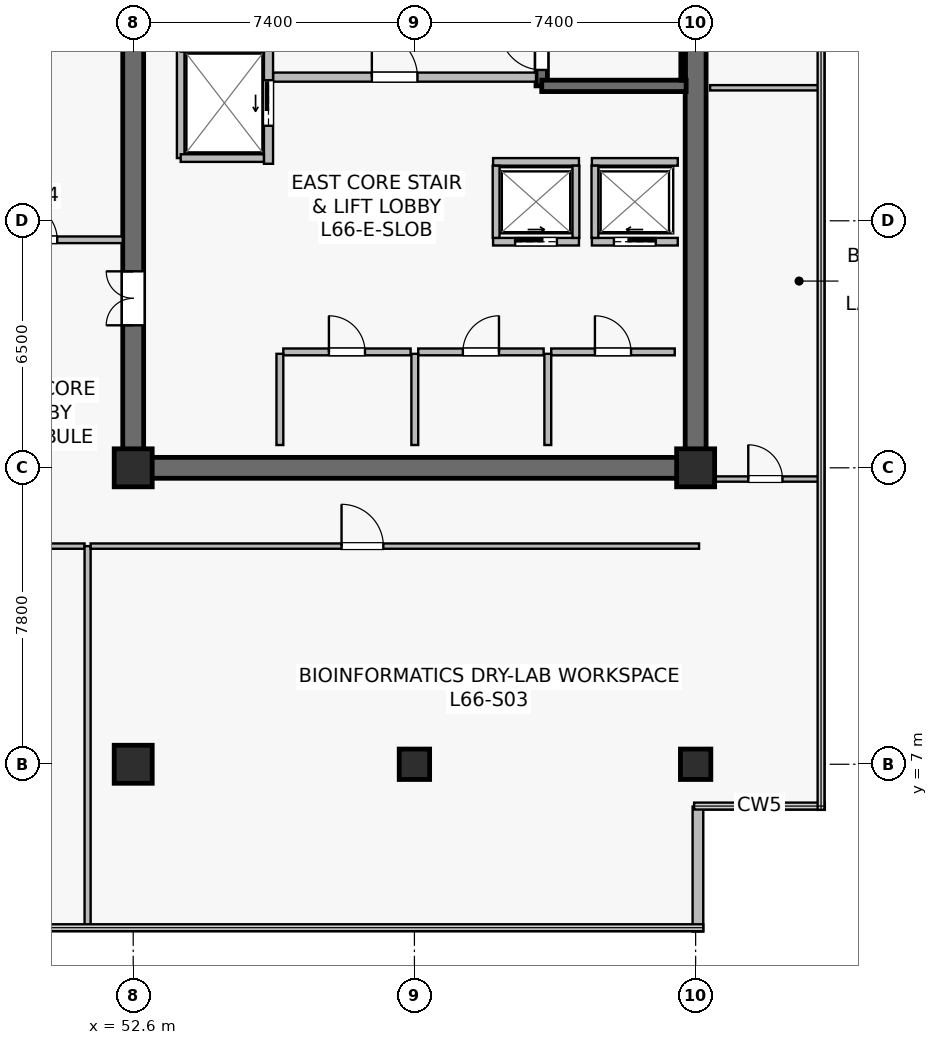
"""IFC4 building model, lengths in metres.
Left out: names, types, materials, properties, quantities, classifications, styles, units other than length and angle.
Written with IfcOpenShell. Run it as: python <this file> out.ifc"""

import sys

from ifc_helpers import new_model, si_unit, direction, frame, frame_2d, origin, origin_2d, place, context, subcontext, project, spatial, rectangle, extrude, source, transform, mapped, element, fill, save


model = new_model("IFC4")
c1 = context("Model", 3, precision=1e-05, world=origin(), true_north=direction((0.0, 1.0)))
c2 = subcontext(c1, "Body", "Model", "MODEL_VIEW")
j1 = project(units=[si_unit("LENGTHUNIT", "METRE"), si_unit("PLANEANGLEUNIT", "RADIAN")], contexts=[c1])
p1 = place(None, origin())
s1 = spatial("IfcSite", under=j1, at=p1, CompositionType="ELEMENT")
p2 = place(p1, origin())
s2 = spatial("IfcBuilding", under=s1, at=p2, CompositionType="ELEMENT")
p3 = place(p2, frame((0.0, 0.0, 275.2)))
s3 = spatial("IfcBuildingStorey", under=s2, at=p3, CompositionType="ELEMENT", Elevation=275.2)
p4 = place(p3, frame((52.325, 14.8, 0.0), z_axis=(0.0, 0.0, 1.0), x_axis=(1.0, 0.0, 0.0)))
e1 = element("IfcWall", 1, at=p4, inside=s3, PredefinedType="SHEAR", context=c2, shape_type="SweptSolid", body=[
    extrude(rectangle(XDim=15.35, YDim=0.55, at=frame_2d((7.675, 0.0))), origin(), (0.0, 0.0, 1.0), 3.8),
])
p5 = place(p3, frame((52.6, 15.075, 0.0), z_axis=(0.0, 0.0, 1.0), x_axis=(0.0, 1.0, 0.0)))
e2 = element("IfcWall", 2, at=p5, inside=s3, PredefinedType="SHEAR", context=c2, shape_type="SweptSolid", body=[
    extrude(rectangle(XDim=18.45, YDim=0.55, at=frame_2d((9.225, 0.0))), origin(), (0.0, 0.0, 1.0), 3.8),
])
p6 = place(p5, frame((3.475, 0.0, 0.0)))
e3 = element("IfcOpeningElement", 3, at=p6, cuts=e2, PredefinedType="OPENING", context=c2, shape_type="SweptSolid", body=[
    extrude(rectangle(XDim=1.42, YDim=2.2, at=frame_2d((0.71, 1.1))), frame((0.0, 0.285, 0.0), z_axis=(0.0, -1.0, 0.0), x_axis=(1.0, 0.0, 0.0)), (0.0, 0.0, 1.0), 0.57),
])
p7 = place(p3, frame((67.4, 15.075, 0.0), z_axis=(0.0, 0.0, 1.0), x_axis=(0.0, 1.0, 0.0)))
e4 = element("IfcWall", 4, at=p7, inside=s3, PredefinedType="SHEAR", context=c2, shape_type="SweptSolid", body=[
    extrude(rectangle(XDim=18.45, YDim=0.55, at=frame_2d((9.225, 0.0))), origin(), (0.0, 0.0, 1.0), 3.8),
])
p8 = place(p3, frame((63.35, 24.85, 0.0), z_axis=(0.0, 0.0, 1.0), x_axis=(0.0, 1.0, 0.0)))
e5 = element("IfcWall", 5, at=p8, inside=s3, PredefinedType="SHEAR", context=c2, shape_type="SweptSolid", body=[
    extrude(rectangle(XDim=8.63, YDim=0.3, at=frame_2d((4.315, 0.0))), origin(), (0.0, 0.0, 1.0), 3.8),
])
p9 = place(p8, frame((0.42, 0.0, 0.0)))
e6 = element("IfcOpeningElement", 6, at=p9, cuts=e5, PredefinedType="OPENING", context=c2, shape_type="SweptSolid", body=[
    extrude(rectangle(XDim=1.1, YDim=2.15, at=frame_2d((0.55, 1.075))), frame((0.0, 0.16, 0.0), z_axis=(0.0, -1.0, 0.0), x_axis=(1.0, 0.0, 0.0)), (0.0, 0.0, 1.0), 0.32),
])
p10 = place(p3, frame((63.35, 24.85, 0.0), z_axis=(0.0, 0.0, 1.0), x_axis=(1.0, 0.0, 0.0)))
e7 = element("IfcWall", 7, at=p10, inside=s3, PredefinedType="SHEAR", context=c2, shape_type="SweptSolid", body=[
    extrude(rectangle(XDim=3.8, YDim=0.3, at=frame_2d((1.9, 0.0))), origin(), (0.0, 0.0, 1.0), 3.8),
])
p11 = place(p3, frame((67.07, 25.0, 0.0), z_axis=(0.0, 0.0, 1.0), x_axis=(0.0, 1.0, 0.0)))
e8 = element("IfcWall", 8, at=p11, inside=s3, PredefinedType="SOLIDWALL", context=c2, shape_type="SweptSolid", body=[
    extrude(rectangle(XDim=8.32, YDim=0.12, at=frame_2d((4.16, 0.0))), origin(), (0.0, 0.0, 1.0), 3.8),
])
m1 = source(origin(), c2, "Body", "SweptSolid", [
    extrude(rectangle(XDim=1.0, YDim=1.0, at=origin_2d()), origin(), (0.0, 0.0, 1.0), 4.1),
])
p12 = place(p3, frame((52.6, 7.0, 0.0), z_axis=(0.0, 0.0, 1.0), x_axis=(1.0, 0.0, 0.0)))
e9 = element("IfcColumn", 9, at=p12, inside=s3, PredefinedType="COLUMN", context=c2, shape_type="MappedRepresentation", body=[
    mapped(m1, transform((0.0, 0.0, 0.0), scale=1.0)),
])
m2 = source(origin(), c2, "Body", "SweptSolid", [
    extrude(rectangle(XDim=0.8, YDim=0.8, at=origin_2d()), origin(), (0.0, 0.0, 1.0), 4.1),
])
p13 = place(p3, frame((60.0, 7.0, 0.0), z_axis=(0.0, 0.0, 1.0), x_axis=(1.0, 0.0, 0.0)))
e10 = element("IfcColumn", 10, at=p13, inside=s3, PredefinedType="COLUMN", context=c2, shape_type="MappedRepresentation", body=[
    mapped(m2, transform((0.0, 0.0, 0.0), scale=1.0)),
])
for number, where, z_axis, x_axis in (
    (11, (52.6, 14.8, 0.0), (0.0, 0.0, 1.0), (1.0, 0.0, 0.0)),
    (12, (67.4, 14.8, 0.0), (0.0, 0.0, 1.0), (1.0, 0.0, 0.0)),
):
    element("IfcColumn", number, at=place(p3, frame(where, z_axis=z_axis, x_axis=x_axis)), inside=s3, PredefinedType="COLUMN", context=c2, shape_type="MappedRepresentation", body=[
        mapped(m1, transform((0.0, 0.0, 0.0), scale=1.0)),
    ])
p14 = place(p3, frame((67.4, 7.0, 0.0), z_axis=(0.0, 0.0, 1.0), x_axis=(1.0, 0.0, 0.0)))
e13 = element("IfcColumn", 13, at=p14, inside=s3, PredefinedType="COLUMN", context=c2, shape_type="MappedRepresentation", body=[
    mapped(m2, transform((0.0, 0.0, 0.0), scale=1.0)),
])
p15 = place(p3, frame((67.46, 2.6, 0.0), z_axis=(0.0, 0.0, 1.0), x_axis=(0.0, 1.0, 0.0)))
e14 = element("IfcWall", 14, at=p15, inside=s3, PredefinedType="STANDARD", context=c2, shape_type="SweptSolid", body=[
    extrude(rectangle(XDim=3.288, YDim=0.28, at=frame_2d((1.644, 0.0))), origin(), (0.0, 0.0, 1.0), 3.8),
])
p16 = place(p3, frame((56.28, 25.08, 0.0), z_axis=(0.0, 0.0, 1.0), x_axis=(1.0, 0.0, 0.0)))
e15 = element("IfcWall", 15, at=p16, inside=s3, PredefinedType="SOLIDWALL", context=c2, shape_type="SweptSolid", body=[
    extrude(rectangle(XDim=6.92, YDim=0.24, at=frame_2d((3.46, 0.0))), origin(), (0.0, 0.0, 1.0), 3.197),
])
p17 = place(p16, frame((2.6, 0.0, 0.0)))
e16 = element("IfcOpeningElement", 16, at=p17, cuts=e15, PredefinedType="OPENING", context=c2, shape_type="SweptSolid", body=[
    extrude(rectangle(XDim=1.2, YDim=2.16, at=frame_2d((0.6, 1.08))), frame((0.0, 0.13, 0.0), z_axis=(0.0, -1.0, 0.0), x_axis=(1.0, 0.0, 0.0)), (0.0, 0.0, 1.0), 0.26),
])
p18 = place(p3, frame((56.16, 22.8, 0.0), z_axis=(0.0, 0.0, 1.0), x_axis=(0.0, 1.0, 0.0)))
e17 = element("IfcWall", 17, at=p18, inside=s3, PredefinedType="SOLIDWALL", context=c2, shape_type="SweptSolid", body=[
    extrude(rectangle(XDim=6.85, YDim=0.24, at=frame_2d((3.425, 0.0))), origin(), (0.0, 0.0, 1.0), 2.935),
])
p19 = place(p18, frame((4.85, 0.0, 0.0)))
e18 = element("IfcOpeningElement", 18, at=p19, cuts=e17, PredefinedType="OPENING", context=c2, shape_type="SweptSolid", body=[
    extrude(rectangle(XDim=1.1, YDim=2.22, at=frame_2d((0.55, 1.11))), frame((0.0, 0.13, 0.0), z_axis=(0.0, -1.0, 0.0), x_axis=(1.0, 0.0, 0.0)), (0.0, 0.0, 1.0), 0.26),
])
p20 = place(p18, frame((1.0, 0.0, 0.0)))
e19 = element("IfcOpeningElement", 19, at=p20, cuts=e17, PredefinedType="OPENING", context=c2, shape_type="SweptSolid", body=[
    extrude(rectangle(XDim=1.2, YDim=2.22, at=frame_2d((0.6, 1.11))), frame((0.0, 0.13, 0.0), z_axis=(0.0, -1.0, 0.0), x_axis=(1.0, 0.0, 0.0)), (0.0, 0.0, 1.0), 0.26),
])
p21 = place(p3, frame((64.67, 20.75, 0.0), z_axis=(0.0, 0.0, 1.0), x_axis=(1.0, 0.0, 0.0)))
e20 = element("IfcWall", 20, at=p21, inside=s3, PredefinedType="SOLIDWALL", context=c2, shape_type="SweptSolid", body=[
    extrude(rectangle(XDim=2.26, YDim=0.2, at=frame_2d((1.13, 0.0))), origin(), (0.0, 0.0, 1.0), 3.8),
])
p22 = place(p21, frame((0.58, 0.0, 0.0)))
e21 = element("IfcOpeningElement", 21, at=p22, cuts=e20, PredefinedType="OPENING", context=c2, shape_type="SweptSolid", body=[
    extrude(rectangle(XDim=1.1, YDim=2.22, at=frame_2d((0.55, 1.11))), frame((0.0, 0.11, 0.0), z_axis=(0.0, -1.0, 0.0), x_axis=(1.0, 0.0, 0.0)), (0.0, 0.0, 1.0), 0.22),
])
p23 = place(p3, frame((64.67, 22.85, 0.0), z_axis=(0.0, 0.0, 1.0), x_axis=(1.0, 0.0, 0.0)))
e22 = element("IfcWall", 22, at=p23, inside=s3, PredefinedType="SOLIDWALL", context=c2, shape_type="SweptSolid", body=[
    extrude(rectangle(XDim=2.26, YDim=0.2, at=frame_2d((1.13, 0.0))), origin(), (0.0, 0.0, 1.0), 3.8),
])
p24 = place(p3, frame((64.75, 20.85, 0.0), z_axis=(0.0, 0.0, 1.0), x_axis=(0.0, 1.0, 0.0)))
e23 = element("IfcWall", 23, at=p24, inside=s3, PredefinedType="SOLIDWALL", context=c2, shape_type="SweptSolid", body=[
    extrude(rectangle(XDim=1.9, YDim=0.18, at=frame_2d((0.95, 0.0))), origin(), (0.0, 0.0, 1.0), 3.8),
])
p25 = place(p3, frame((62.07, 20.75, 0.0), z_axis=(0.0, 0.0, 1.0), x_axis=(1.0, 0.0, 0.0)))
e24 = element("IfcWall", 24, at=p25, inside=s3, PredefinedType="SOLIDWALL", context=c2, shape_type="SweptSolid", body=[
    extrude(rectangle(XDim=2.26, YDim=0.2, at=frame_2d((1.13, 0.0))), origin(), (0.0, 0.0, 1.0), 3.8),
])
p26 = place(p25, frame((0.58, 0.0, 0.0)))
e25 = element("IfcOpeningElement", 25, at=p26, cuts=e24, PredefinedType="OPENING", context=c2, shape_type="SweptSolid", body=[
    extrude(rectangle(XDim=1.1, YDim=2.22, at=frame_2d((0.55, 1.11))), frame((0.0, 0.11, 0.0), z_axis=(0.0, -1.0, 0.0), x_axis=(1.0, 0.0, 0.0)), (0.0, 0.0, 1.0), 0.22),
])
p27 = place(p3, frame((62.07, 22.85, 0.0), z_axis=(0.0, 0.0, 1.0), x_axis=(1.0, 0.0, 0.0)))
e26 = element("IfcWall", 26, at=p27, inside=s3, PredefinedType="SOLIDWALL", context=c2, shape_type="SweptSolid", body=[
    extrude(rectangle(XDim=2.26, YDim=0.2, at=frame_2d((1.13, 0.0))), origin(), (0.0, 0.0, 1.0), 3.8),
])
for number, where, z_axis, x_axis in (
    (27, (62.15, 20.85, 0.0), (0.0, 0.0, 1.0), (0.0, 1.0, 0.0)),
    (28, (64.25, 20.85, 0.0), (0.0, 0.0, 1.0), (0.0, 1.0, 0.0)),
):
    element("IfcWall", number, at=place(p3, frame(where, z_axis=z_axis, x_axis=x_axis)), inside=s3, PredefinedType="SOLIDWALL", context=c2, shape_type="SweptSolid", body=[
        extrude(rectangle(XDim=1.9, YDim=0.18, at=frame_2d((0.95, 0.0))), origin(), (0.0, 0.0, 1.0), 3.8),
    ])
p28 = place(p3, frame((53.85, 22.95, 0.0), z_axis=(0.0, 0.0, 1.0), x_axis=(0.0, 1.0, 0.0)))
e29 = element("IfcWall", 29, at=p28, inside=s3, PredefinedType="SOLIDWALL", context=c2, shape_type="SweptSolid", body=[
    extrude(rectangle(XDim=2.9, YDim=0.2, at=frame_2d((1.45, 0.0))), origin(), (0.0, 0.0, 1.0), 2.935),
])
p29 = place(p3, frame((53.85, 22.95, 0.0), z_axis=(0.0, 0.0, 1.0), x_axis=(1.0, 0.0, 0.0)))
e30 = element("IfcWall", 30, at=p29, inside=s3, PredefinedType="SOLIDWALL", context=c2, shape_type="SweptSolid", body=[
    extrude(rectangle(XDim=2.19, YDim=0.2, at=frame_2d((1.095, 0.0))), origin(), (0.0, 0.0, 1.0), 3.8),
])
p30 = place(p3, frame((63.6, 17.85, 0.0), z_axis=(0.0, 0.0, 1.0), x_axis=(1.0, 0.0, 0.0)))
e31 = element("IfcWall", 31, at=p30, inside=s3, PredefinedType="SOLIDWALL", context=c2, shape_type="SweptSolid", body=[
    extrude(rectangle(XDim=3.25, YDim=0.18, at=frame_2d((1.625, 0.0))), origin(), (0.0, 0.0, 1.0), 3.8),
])
p31 = place(p30, frame((1.15, 0.0, 0.0)))
e32 = element("IfcOpeningElement", 32, at=p31, cuts=e31, PredefinedType="OPENING", context=c2, shape_type="SweptSolid", body=[
    extrude(rectangle(XDim=0.95, YDim=2.15, at=frame_2d((0.475, 1.075))), frame((0.0, 0.1, 0.0), z_axis=(0.0, -1.0, 0.0), x_axis=(1.0, 0.0, 0.0)), (0.0, 0.0, 1.0), 0.2),
])
p32 = place(p3, frame((63.51, 15.4, 0.0), z_axis=(0.0, 0.0, 1.0), x_axis=(0.0, 1.0, 0.0)))
e33 = element("IfcWall", 33, at=p32, inside=s3, PredefinedType="SOLIDWALL", context=c2, shape_type="SweptSolid", body=[
    extrude(rectangle(XDim=2.4, YDim=0.18, at=frame_2d((1.2, 0.0))), origin(), (0.0, 0.0, 1.0), 3.8),
])
p33 = place(p3, frame((60.1, 17.85, 0.0), z_axis=(0.0, 0.0, 1.0), x_axis=(1.0, 0.0, 0.0)))
e34 = element("IfcWall", 34, at=p33, inside=s3, PredefinedType="SOLIDWALL", context=c2, shape_type="SweptSolid", body=[
    extrude(rectangle(XDim=3.3, YDim=0.18, at=frame_2d((1.65, 0.0))), origin(), (0.0, 0.0, 1.0), 3.197),
])
p34 = place(p33, frame((1.175, 0.0, 0.0)))
e35 = element("IfcOpeningElement", 35, at=p34, cuts=e34, PredefinedType="OPENING", context=c2, shape_type="SweptSolid", body=[
    extrude(rectangle(XDim=0.95, YDim=2.15, at=frame_2d((0.475, 1.075))), frame((0.0, 0.1, 0.0), z_axis=(0.0, -1.0, 0.0), x_axis=(1.0, 0.0, 0.0)), (0.0, 0.0, 1.0), 0.2),
])
p35 = place(p3, frame((60.01, 15.4, 0.0), z_axis=(0.0, 0.0, 1.0), x_axis=(0.0, 1.0, 0.0)))
e36 = element("IfcWall", 36, at=p35, inside=s3, PredefinedType="SOLIDWALL", context=c2, shape_type="SweptSolid", body=[
    extrude(rectangle(XDim=2.4, YDim=0.18, at=frame_2d((1.2, 0.0))), origin(), (0.0, 0.0, 1.0), 3.197),
])
p36 = place(p3, frame((56.55, 17.85, 0.0), z_axis=(0.0, 0.0, 1.0), x_axis=(1.0, 0.0, 0.0)))
e37 = element("IfcWall", 37, at=p36, inside=s3, PredefinedType="SOLIDWALL", context=c2, shape_type="SweptSolid", body=[
    extrude(rectangle(XDim=3.35, YDim=0.18, at=frame_2d((1.675, 0.0))), origin(), (0.0, 0.0, 1.0), 3.197),
])
p37 = place(p36, frame((1.2, 0.0, 0.0)))
e38 = element("IfcOpeningElement", 38, at=p37, cuts=e37, PredefinedType="OPENING", context=c2, shape_type="SweptSolid", body=[
    extrude(rectangle(XDim=0.95, YDim=2.15, at=frame_2d((0.475, 1.075))), frame((0.0, 0.1, 0.0), z_axis=(0.0, -1.0, 0.0), x_axis=(1.0, 0.0, 0.0)), (0.0, 0.0, 1.0), 0.2),
])
p38 = place(p3, frame((56.46, 15.4, 0.0), z_axis=(0.0, 0.0, 1.0), x_axis=(0.0, 1.0, 0.0)))
e39 = element("IfcWall", 39, at=p38, inside=s3, PredefinedType="SOLIDWALL", context=c2, shape_type="SweptSolid", body=[
    extrude(rectangle(XDim=2.4, YDim=0.18, at=frame_2d((1.2, 0.0))), origin(), (0.0, 0.0, 1.0), 3.8),
])
p39 = place(p3, frame((48.3, 20.8, 0.0), z_axis=(0.0, 0.0, 1.0), x_axis=(1.0, 0.0, 0.0)))
e40 = element("IfcWall", 40, at=p39, inside=s3, PredefinedType="PARTITIONING", context=c2, shape_type="SweptSolid", body=[
    extrude(rectangle(XDim=4.025, YDim=0.175, at=frame_2d((2.012, 0.0))), origin(), (0.0, 0.0, 1.0), 3.8),
])
p40 = place(p39, frame((1.35, 0.0, 0.0)))
e41 = element("IfcOpeningElement", 41, at=p40, cuts=e40, PredefinedType="OPENING", context=c2, shape_type="SweptSolid", body=[
    extrude(rectangle(XDim=0.95, YDim=2.15, at=frame_2d((0.475, 1.075))), frame((0.0, 0.098, 0.0), z_axis=(0.0, -1.0, 0.0), x_axis=(1.0, 0.0, 0.0)), (0.0, 0.0, 1.0), 0.195),
])
p41 = place(p3, frame((27.08, 12.74, 0.0), z_axis=(0.0, 0.0, 1.0), x_axis=(1.0, 0.0, 0.0)))
e42 = element("IfcWall", 42, at=p41, inside=s3, PredefinedType="PARTITIONING", context=c2, shape_type="SweptSolid", body=[
    extrude(rectangle(XDim=24.24, YDim=0.14, at=frame_2d((12.12, 0.0))), origin(), (0.0, 0.0, 1.0), 3.197),
])
p42 = place(p41, frame((12.917, 0.0, 0.0)))
e43 = element("IfcOpeningElement", 43, at=p42, cuts=e42, PredefinedType="OPENING", context=c2, shape_type="SweptSolid", body=[
    extrude(rectangle(XDim=1.1, YDim=2.18, at=frame_2d((0.55, 1.09))), frame((0.0, 0.08, 0.0), z_axis=(0.0, -1.0, 0.0), x_axis=(1.0, 0.0, 0.0)), (0.0, 0.0, 1.0), 0.16),
])
p43 = place(p3, frame((51.4, 2.71, 0.0), z_axis=(0.0, 0.0, 1.0), x_axis=(0.0, 1.0, 0.0)))
e44 = element("IfcWall", 44, at=p43, inside=s3, PredefinedType="PARTITIONING", context=c2, shape_type="SweptSolid", body=[
    extrude(rectangle(XDim=10.03, YDim=0.16, at=frame_2d((5.015, 0.0))), origin(), (0.0, 0.0, 1.0), 3.135),
])
p44 = place(p3, frame((51.48, 12.74, 0.0), z_axis=(0.0, 0.0, 1.0), x_axis=(1.0, 0.0, 0.0)))
e45 = element("IfcWall", 45, at=p44, inside=s3, PredefinedType="PARTITIONING", context=c2, shape_type="SweptSolid", body=[
    extrude(rectangle(XDim=16.01, YDim=0.14, at=frame_2d((8.005, 0.0))), origin(), (0.0, 0.0, 1.0), 3.197),
])
p45 = place(p44, frame((6.602, 0.0, 0.0)))
e46 = element("IfcOpeningElement", 46, at=p45, cuts=e45, PredefinedType="OPENING", context=c2, shape_type="SweptSolid", body=[
    extrude(rectangle(XDim=1.1, YDim=2.18, at=frame_2d((0.55, 1.09))), frame((0.0, 0.08, 0.0), z_axis=(0.0, -1.0, 0.0), x_axis=(1.0, 0.0, 0.0)), (0.0, 0.0, 1.0), 0.16),
])
p46 = place(p3, frame((67.78, 24.8, 0.0), z_axis=(0.0, 0.0, 1.0), x_axis=(1.0, 0.0, 0.0)))
e47 = element("IfcWall", 47, at=p46, inside=s3, PredefinedType="PARTITIONING", context=c2, shape_type="SweptSolid", body=[
    extrude(rectangle(XDim=2.91, YDim=0.14, at=frame_2d((1.455, 0.0))), origin(), (0.0, 0.0, 1.0), 3.8),
])
p47 = place(p3, frame((67.78, 14.505, 0.0), z_axis=(0.0, 0.0, 1.0), x_axis=(1.0, 0.0, 0.0)))
e48 = element("IfcWall", 48, at=p47, inside=s3, PredefinedType="PARTITIONING", context=c2, shape_type="SweptSolid", body=[
    extrude(rectangle(XDim=2.91, YDim=0.14, at=frame_2d((1.455, 0.0))), origin(), (0.0, 0.0, 1.0), 3.8),
])
p48 = place(p47, frame((1.005, 0.0, 0.0)))
e49 = element("IfcOpeningElement", 49, at=p48, cuts=e48, PredefinedType="OPENING", context=c2, shape_type="SweptSolid", body=[
    extrude(rectangle(XDim=0.9, YDim=2.1, at=frame_2d((0.45, 1.05))), frame((0.0, 0.08, 0.0), z_axis=(0.0, -1.0, 0.0), x_axis=(1.0, 0.0, 0.0)), (0.0, 0.0, 1.0), 0.16),
])
m3 = source(origin(), c2, "Body", "SweptSolid", [
    extrude(rectangle(XDim=1.1, YDim=2.15, at=frame_2d((0.55, 1.075))), frame((0.0, 0.025, 0.0), z_axis=(0.0, -1.0, 0.0), x_axis=(1.0, 0.0, 0.0)), (0.0, 0.0, 1.0), 0.05),
])
p49 = place(p9, origin())
e50 = element("IfcDoor", 50, at=p49, inside=s3, OperationType="SINGLE_SWING_RIGHT", PredefinedType="DOOR", context=c2, shape_type="MappedRepresentation", body=[
    mapped(m3, transform((0.0, 0.0, 0.0), scale=1.0)),
])
fill(e6, e50)
m4 = source(origin(), c2, "Body", "SweptSolid", [
    extrude(rectangle(XDim=1.2, YDim=2.16, at=frame_2d((0.6, 1.08))), frame((0.0, 0.025, 0.0), z_axis=(0.0, -1.0, 0.0), x_axis=(1.0, 0.0, 0.0)), (0.0, 0.0, 1.0), 0.05),
])
p50 = place(p17, origin())
e51 = element("IfcDoor", 51, at=p50, inside=s3, OperationType="SINGLE_SWING_LEFT", PredefinedType="DOOR", context=c2, shape_type="MappedRepresentation", body=[
    mapped(m4, transform((0.0, 0.0, 0.0), scale=1.0)),
])
fill(e16, e51)
m5 = source(origin(), c2, "Body", "SweptSolid", [
    extrude(rectangle(XDim=1.1, YDim=2.22, at=frame_2d((0.55, 1.11))), frame((0.0, 0.025, 0.0), z_axis=(0.0, -1.0, 0.0), x_axis=(1.0, 0.0, 0.0)), (0.0, 0.0, 1.0), 0.05),
])
p51 = place(p22, origin())
e52 = element("IfcDoor", 52, at=p51, inside=s3, OperationType="SLIDING_TO_LEFT", PredefinedType="USERDEFINED", context=c2, shape_type="MappedRepresentation", body=[
    mapped(m5, transform((0.0, 0.0, 0.0), scale=1.0)),
])
fill(e21, e52)
p52 = place(p26, origin())
e53 = element("IfcDoor", 53, at=p52, inside=s3, OperationType="SLIDING_TO_RIGHT", PredefinedType="USERDEFINED", context=c2, shape_type="MappedRepresentation", body=[
    mapped(m5, transform((0.0, 0.0, 0.0), scale=1.0)),
])
fill(e25, e53)
m6 = source(origin(), c2, "Body", "SweptSolid", [
    extrude(rectangle(XDim=1.2, YDim=2.22, at=frame_2d((0.6, 1.11))), frame((0.0, 0.025, 0.0), z_axis=(0.0, -1.0, 0.0), x_axis=(1.0, 0.0, 0.0)), (0.0, 0.0, 1.0), 0.05),
])
p53 = place(p20, origin())
e54 = element("IfcDoor", 54, at=p53, inside=s3, OperationType="SLIDING_TO_LEFT", PredefinedType="USERDEFINED", context=c2, shape_type="MappedRepresentation", body=[
    mapped(m6, transform((0.0, 0.0, 0.0), scale=1.0)),
])
fill(e19, e54)
m7 = source(origin(), c2, "Body", "SweptSolid", [
    extrude(rectangle(XDim=0.95, YDim=2.15, at=frame_2d((0.475, 1.075))), frame((0.0, 0.025, 0.0), z_axis=(0.0, -1.0, 0.0), x_axis=(1.0, 0.0, 0.0)), (0.0, 0.0, 1.0), 0.05),
])
p54 = place(p31, origin())
e55 = element("IfcDoor", 55, at=p54, inside=s3, OperationType="SINGLE_SWING_LEFT", PredefinedType="DOOR", context=c2, shape_type="MappedRepresentation", body=[
    mapped(m7, transform((0.0, 0.0, 0.0), scale=1.0)),
])
fill(e32, e55)
p55 = place(p34, origin())
e56 = element("IfcDoor", 56, at=p55, inside=s3, OperationType="SINGLE_SWING_RIGHT", PredefinedType="DOOR", context=c2, shape_type="MappedRepresentation", body=[
    mapped(m7, transform((0.0, 0.0, 0.0), scale=1.0)),
])
fill(e35, e56)
p56 = place(p37, origin())
e57 = element("IfcDoor", 57, at=p56, inside=s3, OperationType="SINGLE_SWING_LEFT", PredefinedType="DOOR", context=c2, shape_type="MappedRepresentation", body=[
    mapped(m7, transform((0.0, 0.0, 0.0), scale=1.0)),
])
fill(e38, e57)
m8 = source(origin(), c2, "Body", "SweptSolid", [
    extrude(rectangle(XDim=1.42, YDim=2.2, at=frame_2d((0.71, 1.1))), frame((0.0, 0.025, 0.0), z_axis=(0.0, -1.0, 0.0), x_axis=(1.0, 0.0, 0.0)), (0.0, 0.0, 1.0), 0.05),
])
p57 = place(p6, origin())
e58 = element("IfcDoor", 58, at=p57, inside=s3, OperationType="DOUBLE_DOOR_SINGLE_SWING", PredefinedType="DOOR", context=c2, shape_type="MappedRepresentation", body=[
    mapped(m8, transform((0.0, 0.0, 0.0), scale=1.0)),
])
fill(e3, e58)
p58 = place(p40, origin())
e59 = element("IfcDoor", 59, at=p58, inside=s3, OperationType="SINGLE_SWING_LEFT", PredefinedType="DOOR", context=c2, shape_type="MappedRepresentation", body=[
    mapped(m7, transform((0.0, 0.0, 0.0), scale=1.0)),
])
fill(e41, e59)
m9 = source(origin(), c2, "Body", "SweptSolid", [
    extrude(rectangle(XDim=1.1, YDim=2.18, at=frame_2d((0.55, 1.09))), frame((0.0, 0.025, 0.0), z_axis=(0.0, -1.0, 0.0), x_axis=(1.0, 0.0, 0.0)), (0.0, 0.0, 1.0), 0.05),
])
p59 = place(p45, origin())
e60 = element("IfcDoor", 60, at=p59, inside=s3, OperationType="SINGLE_SWING_LEFT", PredefinedType="DOOR", context=c2, shape_type="MappedRepresentation", body=[
    mapped(m9, transform((0.0, 0.0, 0.0), scale=1.0)),
])
fill(e46, e60)
m10 = source(origin(), c2, "Body", "SweptSolid", [
    extrude(rectangle(XDim=0.9, YDim=2.1, at=frame_2d((0.45, 1.05))), frame((0.0, 0.025, 0.0), z_axis=(0.0, -1.0, 0.0), x_axis=(1.0, 0.0, 0.0)), (0.0, 0.0, 1.0), 0.05),
])
p60 = place(p48, origin())
e61 = element("IfcDoor", 61, at=p60, inside=s3, OperationType="SINGLE_SWING_LEFT", PredefinedType="DOOR", context=c2, shape_type="MappedRepresentation", body=[
    mapped(m10, transform((0.0, 0.0, 0.0), scale=1.0)),
])
fill(e49, e61)
save(model, sys.argv[1])
